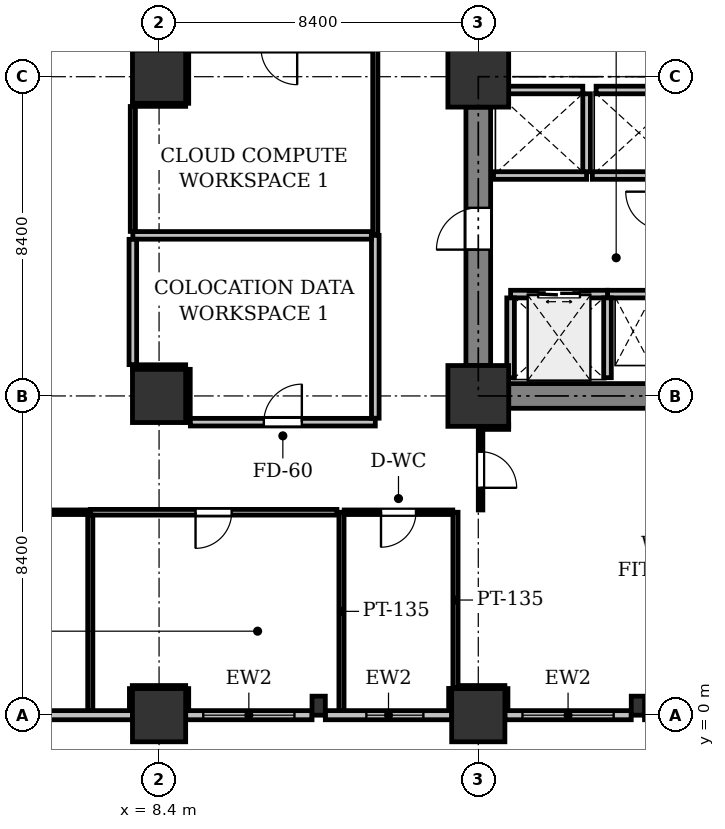
"""IFC4 building model, lengths in metres.
Left out: names, types, materials, properties, quantities, classifications, styles, units other than length and angle.
Written with IfcOpenShell. Run it as: python <this file> out.ifc"""

import sys

from ifc_helpers import new_model, si_unit, direction, frame, frame_2d, origin, origin_2d, place, context, subcontext, project, spatial, rectangle, extrude, element, fill, save


model = new_model("IFC4")
c1 = context("Model", 3, precision=1e-05, world=origin(), true_north=direction((0.0, 1.0)))
c2 = subcontext(c1, "Body", "Model", "MODEL_VIEW")
j1 = project(units=[si_unit("LENGTHUNIT", "METRE"), si_unit("PLANEANGLEUNIT", "RADIAN")], contexts=[c1])
p1 = place(None, origin())
s1 = spatial("IfcSite", under=j1, at=p1, CompositionType="ELEMENT")
p2 = place(p1, origin())
s2 = spatial("IfcBuilding", under=s1, at=p2, CompositionType="ELEMENT")
p3 = place(p2, frame((0.0, 0.0, 15.0)))
s3 = spatial("IfcBuildingStorey", under=s2, at=p3, CompositionType="ELEMENT", Elevation=15.0)
for number, where, z_axis, x_axis in (
    (1, (8.4, 0.0, 0.0), (0.0, 0.0, 1.0), (1.0, 0.0, 0.0)),
    (2, (8.4, 8.4, 0.0), (0.0, 0.0, 1.0), (1.0, 0.0, 0.0)),
    (3, (8.4, 16.8, 0.0), (0.0, 0.0, 1.0), (1.0, 0.0, 0.0)),
    (4, (16.8, 0.0, 0.0), (0.0, 0.0, 1.0), (1.0, 0.0, 0.0)),
):
    element("IfcColumn", number, at=place(p3, frame(where, z_axis=z_axis, x_axis=x_axis)), inside=s3, PredefinedType="COLUMN", context=c2, shape_type="SweptSolid", body=[
        extrude(rectangle(XDim=1.4, YDim=1.4, at=origin_2d()), origin(), (0.0, 0.0, 1.0), 4.8),
    ])
for number, where, z_axis, x_axis in (
    (5, (16.8, 8.4, 0.0), (0.0, 0.0, 1.0), (1.0, 0.0, 0.0)),
    (6, (16.8, 16.8, 0.0), (0.0, 0.0, 1.0), (1.0, 0.0, 0.0)),
):
    element("IfcColumn", number, at=place(p3, frame(where, z_axis=z_axis, x_axis=x_axis)), inside=s3, PredefinedType="COLUMN", context=c2, shape_type="SweptSolid", body=[
        extrude(rectangle(XDim=1.6, YDim=1.6, at=origin_2d()), origin(), (0.0, 0.0, 1.0), 4.8),
    ])
for number, where, z_axis, x_axis in (
    (7, (12.6, 0.25, 0.0), (0.0, 0.0, 1.0), (1.0, 0.0, 0.0)),
    (8, (21.0, 0.25, 0.0), (0.0, 0.0, 1.0), (1.0, 0.0, 0.0)),
):
    element("IfcColumn", number, at=place(p3, frame(where, z_axis=z_axis, x_axis=x_axis)), inside=s3, PredefinedType="PILASTER", context=c2, shape_type="SweptSolid", body=[
        extrude(rectangle(XDim=0.35, YDim=0.5, at=origin_2d()), origin(), (0.0, 0.0, 1.0), 4.8),
    ])
p4 = place(p3, frame((24.5, 0.0, 0.0), z_axis=(0.0, 0.0, 1.0), x_axis=(-1.0, 0.0, 0.0)))
e9 = element("IfcWall", 9, at=p4, inside=s3, PredefinedType="STANDARD", context=c2, shape_type="SweptSolid", body=[
    extrude(rectangle(XDim=3.325, YDim=0.24, at=frame_2d((1.663, 0.0))), origin(), (0.0, 0.0, 1.0), 3.05),
])
p5 = place(p4, frame((0.913, 0.0, 0.9)))
e10 = element("IfcOpeningElement", 10, at=p5, cuts=e9, PredefinedType="OPENING", context=c2, shape_type="SweptSolid", body=[
    extrude(rectangle(XDim=1.5, YDim=1.6, at=frame_2d((0.75, 0.8))), frame((0.0, 0.13, 0.0), z_axis=(0.0, -1.0, 0.0), x_axis=(1.0, 0.0, 0.0)), (0.0, 0.0, 1.0), 0.26),
])
p6 = place(p3, frame((20.825, 0.0, 0.0), z_axis=(0.0, 0.0, 1.0), x_axis=(-1.0, 0.0, 0.0)))
e11 = element("IfcWall", 11, at=p6, inside=s3, PredefinedType="STANDARD", context=c2, shape_type="SweptSolid", body=[
    extrude(rectangle(XDim=3.325, YDim=0.24, at=frame_2d((1.663, 0.0))), origin(), (0.0, 0.0, 1.0), 3.05),
])
p7 = place(p6, frame((0.462, 0.0, 0.9)))
e12 = element("IfcOpeningElement", 12, at=p7, cuts=e11, PredefinedType="OPENING", context=c2, shape_type="SweptSolid", body=[
    extrude(rectangle(XDim=2.4, YDim=1.8, at=frame_2d((1.2, 0.9))), frame((0.0, 0.13, 0.0), z_axis=(0.0, -1.0, 0.0), x_axis=(1.0, 0.0, 0.0)), (0.0, 0.0, 1.0), 0.26),
])
p8 = place(p3, frame((16.1, 0.0, 0.0), z_axis=(0.0, 0.0, 1.0), x_axis=(-1.0, 0.0, 0.0)))
e13 = element("IfcWall", 13, at=p8, inside=s3, PredefinedType="STANDARD", context=c2, shape_type="SweptSolid", body=[
    extrude(rectangle(XDim=3.325, YDim=0.24, at=frame_2d((1.663, 0.0))), origin(), (0.0, 0.0, 1.0), 3.05),
])
p9 = place(p8, frame((0.745, 0.0, 0.9)))
e14 = element("IfcOpeningElement", 14, at=p9, cuts=e13, PredefinedType="OPENING", context=c2, shape_type="SweptSolid", body=[
    extrude(rectangle(XDim=1.5, YDim=1.6, at=frame_2d((0.75, 0.8))), frame((0.0, 0.13, 0.0), z_axis=(0.0, -1.0, 0.0), x_axis=(1.0, 0.0, 0.0)), (0.0, 0.0, 1.0), 0.26),
])
p10 = place(p3, frame((12.425, 0.0, 0.0), z_axis=(0.0, 0.0, 1.0), x_axis=(-1.0, 0.0, 0.0)))
e15 = element("IfcWall", 15, at=p10, inside=s3, PredefinedType="STANDARD", context=c2, shape_type="SweptSolid", body=[
    extrude(rectangle(XDim=3.325, YDim=0.24, at=frame_2d((1.663, 0.0))), origin(), (0.0, 0.0, 1.0), 3.05),
])
p11 = place(p10, frame((0.462, 0.0, 0.9)))
e16 = element("IfcOpeningElement", 16, at=p11, cuts=e15, PredefinedType="OPENING", context=c2, shape_type="SweptSolid", body=[
    extrude(rectangle(XDim=2.4, YDim=1.8, at=frame_2d((1.2, 0.9))), frame((0.0, 0.13, 0.0), z_axis=(0.0, -1.0, 0.0), x_axis=(1.0, 0.0, 0.0)), (0.0, 0.0, 1.0), 0.26),
])
p12 = place(p3, frame((7.7, 0.0, 0.0), z_axis=(0.0, 0.0, 1.0), x_axis=(-1.0, 0.0, 0.0)))
e17 = element("IfcWall", 17, at=p12, inside=s3, PredefinedType="STANDARD", context=c2, shape_type="SweptSolid", body=[
    extrude(rectangle(XDim=7.0, YDim=0.24, at=frame_2d((3.5, 0.0))), origin(), (0.0, 0.0, 1.0), 3.05),
])
p13 = place(p12, frame((3.27, 0.0, 0.9)))
e18 = element("IfcOpeningElement", 18, at=p13, cuts=e17, PredefinedType="OPENING", context=c2, shape_type="SweptSolid", body=[
    extrude(rectangle(XDim=1.5, YDim=1.6, at=frame_2d((0.75, 0.8))), frame((0.0, 0.13, 0.0), z_axis=(0.0, -1.0, 0.0), x_axis=(1.0, 0.0, 0.0)), (0.0, 0.0, 1.0), 0.26),
])
p14 = place(p3, frame((17.6, 8.4, 0.0), z_axis=(0.0, 0.0, 1.0), x_axis=(1.0, 0.0, 0.0)))
e19 = element("IfcWall", 19, at=p14, inside=s3, PredefinedType="SHEAR", context=c2, shape_type="SweptSolid", body=[
    extrude(rectangle(XDim=6.8, YDim=0.65, at=frame_2d((3.4, 0.0))), origin(), (0.0, 0.0, 1.0), 4.45),
])
p15 = place(p3, frame((16.8, 9.2, 0.0), z_axis=(0.0, 0.0, 1.0), x_axis=(0.0, 1.0, 0.0)))
e20 = element("IfcWall", 20, at=p15, inside=s3, PredefinedType="SHEAR", context=c2, shape_type="SweptSolid", body=[
    extrude(rectangle(XDim=6.8, YDim=0.65, at=frame_2d((3.4, 0.0))), origin(), (0.0, 0.0, 1.0), 4.45),
])
p16 = place(p15, frame((3.05, 0.0, 0.0)))
e21 = element("IfcOpeningElement", 21, at=p16, cuts=e20, PredefinedType="OPENING", context=c2, shape_type="SweptSolid", body=[
    extrude(rectangle(XDim=1.1, YDim=2.15, at=frame_2d((0.55, 1.075))), frame((0.0, 0.335, 0.0), z_axis=(0.0, -1.0, 0.0), x_axis=(1.0, 0.0, 0.0)), (0.0, 0.0, 1.0), 0.67),
])
p17 = place(p3, frame((20.2, 11.08, 0.0), z_axis=(0.0, 0.0, 1.0), x_axis=(1.0, 0.0, 0.0)))
e22 = element("IfcWall", 22, at=p17, inside=s3, PredefinedType="PARTITIONING", context=c2, shape_type="SweptSolid", body=[
    extrude(rectangle(XDim=1.35, YDim=0.2, at=frame_2d((0.675, 0.0))), origin(), (0.0, 0.0, 1.0), 4.45),
])
p18 = place(p3, frame((17.65, 11.08, 0.0), z_axis=(0.0, 0.0, 1.0), x_axis=(1.0, 0.0, 0.0)))
e23 = element("IfcWall", 23, at=p18, inside=s3, PredefinedType="PARTITIONING", context=c2, shape_type="SweptSolid", body=[
    extrude(rectangle(XDim=2.55, YDim=0.2, at=frame_2d((1.275, 0.0))), origin(), (0.0, 0.0, 1.0), 4.45),
])
p19 = place(p18, frame((0.725, 0.0, 0.0)))
e24 = element("IfcOpeningElement", 24, at=p19, cuts=e23, PredefinedType="OPENING", context=c2, shape_type="SweptSolid", body=[
    extrude(rectangle(XDim=1.1, YDim=2.2, at=frame_2d((0.55, 1.1))), frame((0.0, 0.11, 0.0), z_axis=(0.0, -1.0, 0.0), x_axis=(1.0, 0.0, 0.0)), (0.0, 0.0, 1.0), 0.22),
])
for number, where, z_axis, x_axis in (
    (25, (20.2, 8.88, 0.0), (0.0, 0.0, 1.0), (0.0, 1.0, 0.0)),
    (26, (17.65, 8.88, 0.0), (0.0, 0.0, 1.0), (0.0, 1.0, 0.0)),
):
    element("IfcWall", number, at=place(p3, frame(where, z_axis=z_axis, x_axis=x_axis)), inside=s3, PredefinedType="PARTITIONING", context=c2, shape_type="SweptSolid", body=[
        extrude(rectangle(XDim=2.1, YDim=0.2, at=frame_2d((1.05, 0.0))), origin(), (0.0, 0.0, 1.0), 4.45),
    ])
p20 = place(p3, frame((17.2, 14.2, 0.0), z_axis=(0.0, 0.0, 1.0), x_axis=(1.0, 0.0, 0.0)))
e27 = element("IfcWall", 27, at=p20, inside=s3, PredefinedType="PARTITIONING", context=c2, shape_type="SweptSolid", body=[
    extrude(rectangle(XDim=2.45, YDim=0.2, at=frame_2d((1.225, 0.0))), origin(), (0.0, 0.0, 1.0), 4.45),
])
p21 = place(p3, frame((19.65, 14.3, 0.0), z_axis=(0.0, 0.0, 1.0), x_axis=(0.0, 1.0, 0.0)))
e28 = element("IfcWall", 28, at=p21, inside=s3, PredefinedType="PARTITIONING", context=c2, shape_type="SweptSolid", body=[
    extrude(rectangle(XDim=2.05, YDim=0.2, at=frame_2d((1.025, 0.0))), origin(), (0.0, 0.0, 1.0), 4.45),
])
p22 = place(p3, frame((17.3, 16.45, 0.0), z_axis=(0.0, 0.0, 1.0), x_axis=(1.0, 0.0, 0.0)))
e29 = element("IfcWall", 29, at=p22, inside=s3, PredefinedType="PARTITIONING", context=c2, shape_type="SweptSolid", body=[
    extrude(rectangle(XDim=2.25, YDim=0.2, at=frame_2d((1.125, 0.0))), origin(), (0.0, 0.0, 1.0), 3.05),
])
p23 = place(p3, frame((19.8, 14.2, 0.0), z_axis=(0.0, 0.0, 1.0), x_axis=(1.0, 0.0, 0.0)))
e30 = element("IfcWall", 30, at=p23, inside=s3, PredefinedType="PARTITIONING", context=c2, shape_type="SweptSolid", body=[
    extrude(rectangle(XDim=2.45, YDim=0.2, at=frame_2d((1.225, 0.0))), origin(), (0.0, 0.0, 1.0), 4.45),
])
p24 = place(p3, frame((19.9, 16.45, 0.0), z_axis=(0.0, 0.0, 1.0), x_axis=(1.0, 0.0, 0.0)))
e31 = element("IfcWall", 31, at=p24, inside=s3, PredefinedType="PARTITIONING", context=c2, shape_type="SweptSolid", body=[
    extrude(rectangle(XDim=2.25, YDim=0.2, at=frame_2d((1.125, 0.0))), origin(), (0.0, 0.0, 1.0), 3.05),
])
p25 = place(p3, frame((13.2, 5.34, 0.0), z_axis=(0.0, 0.0, 1.0), x_axis=(0.0, -1.0, 0.0)))
e32 = element("IfcWall", 32, at=p25, inside=s3, PredefinedType="PARTITIONING", context=c2, shape_type="SweptSolid", body=[
    extrude(rectangle(XDim=5.216, YDim=0.135, at=frame_2d((2.608, 0.0))), origin(), (0.0, 0.0, 1.0), 3.05),
])
p26 = place(p3, frame((16.08, 0.124, 0.0), z_axis=(0.0, 0.0, 1.0), x_axis=(0.000421052594, 0.999999911357, 0.0)))
e33 = element("IfcWall", 33, at=p26, inside=s3, PredefinedType="PARTITIONING", context=c2, shape_type="SweptSolid", body=[
    extrude(rectangle(XDim=0.58, YDim=0.12, at=frame_2d((0.29, 0.0))), origin(), (0.0, 0.0, 1.0), 3.05),
])
p27 = place(p3, frame((16.2, 0.72, 0.0), z_axis=(0.0, 0.0, 1.0), x_axis=(0.0, 1.0, 0.0)))
e34 = element("IfcWall", 34, at=p27, inside=s3, PredefinedType="PARTITIONING", context=c2, shape_type="SweptSolid", body=[
    extrude(rectangle(XDim=4.62, YDim=0.135, at=frame_2d((2.31, 0.0))), origin(), (0.0, 0.0, 1.0), 4.45),
])
p28 = place(p3, frame((16.128, 5.34, 0.0), z_axis=(0.0, 0.0, 1.0), x_axis=(-1.0, 0.0, 0.0)))
e35 = element("IfcWall", 35, at=p28, inside=s3, PredefinedType="PARTITIONING", context=c2, shape_type="SweptSolid", body=[
    extrude(rectangle(XDim=2.857, YDim=0.12, at=frame_2d((1.428, 0.0))), origin(), (0.0, 0.0, 1.0), 4.45),
])
p29 = place(p28, frame((0.969, 0.0, 0.0)))
e36 = element("IfcOpeningElement", 36, at=p29, cuts=e35, PredefinedType="OPENING", context=c2, shape_type="SweptSolid", body=[
    extrude(rectangle(XDim=0.92, YDim=2.1, at=frame_2d((0.46, 1.05))), frame((0.0, 0.07, 0.0), z_axis=(0.0, -1.0, 0.0), x_axis=(1.0, 0.0, 0.0)), (0.0, 0.0, 1.0), 0.14),
])
p30 = place(p3, frame((7.71, 9.12, 0.0), z_axis=(0.0, 0.0, 1.0), x_axis=(1.0, 0.0, 0.0)))
e37 = element("IfcWall", 37, at=p30, inside=s3, PredefinedType="PARTITIONING", context=c2, shape_type="SweptSolid", body=[
    extrude(rectangle(XDim=1.39, YDim=0.2, at=frame_2d((0.695, 0.0))), origin(), (0.0, 0.0, 1.0), 3.25),
])
p31 = place(p3, frame((9.12, 9.1, 0.0), z_axis=(0.0, 0.0, 1.0), x_axis=(0.0, -1.0, 0.0)))
e38 = element("IfcWall", 38, at=p31, inside=s3, PredefinedType="PARTITIONING", context=c2, shape_type="SweptSolid", body=[
    extrude(rectangle(XDim=1.39, YDim=0.2, at=frame_2d((0.695, 0.0))), origin(), (0.0, 0.0, 1.0), 3.05),
])
p32 = place(p3, frame((9.224, 7.71, 0.0), z_axis=(0.0, 0.0, 1.0), x_axis=(1.0, 0.0, 0.0)))
e39 = element("IfcWall", 39, at=p32, inside=s3, PredefinedType="PARTITIONING", context=c2, shape_type="SweptSolid", body=[
    extrude(rectangle(XDim=4.866, YDim=0.2, at=frame_2d((2.433, 0.0))), origin(), (0.0, 0.0, 1.0), 4.044),
])
p33 = place(p32, frame((1.933, 0.0, 0.0)))
e40 = element("IfcOpeningElement", 40, at=p33, cuts=e39, PredefinedType="OPENING", context=c2, shape_type="SweptSolid", body=[
    extrude(rectangle(XDim=1.0, YDim=2.15, at=frame_2d((0.5, 1.075))), frame((0.0, 0.11, 0.0), z_axis=(0.0, -1.0, 0.0), x_axis=(1.0, 0.0, 0.0)), (0.0, 0.0, 1.0), 0.22),
])
p34 = place(p3, frame((14.09, 7.814, 0.0), z_axis=(0.0, 0.0, 1.0), x_axis=(0.0, 1.0, 0.0)))
e41 = element("IfcWall", 41, at=p34, inside=s3, PredefinedType="PARTITIONING", context=c2, shape_type="SweptSolid", body=[
    extrude(rectangle(XDim=4.811, YDim=0.2, at=frame_2d((2.406, 0.0))), origin(), (0.0, 0.0, 1.0), 3.05),
])
p35 = place(p3, frame((13.986, 12.625, 0.0), z_axis=(0.0, 0.0, 1.0), x_axis=(-1.0, 0.0, 0.0)))
e42 = element("IfcWall", 42, at=p35, inside=s3, PredefinedType="PARTITIONING", context=c2, shape_type="SweptSolid", body=[
    extrude(rectangle(XDim=6.276, YDim=0.2, at=frame_2d((3.138, 0.0))), origin(), (0.0, 0.0, 1.0), 3.25),
])
p36 = place(p3, frame((7.71, 12.521, 0.0), z_axis=(0.0, 0.0, 1.0), x_axis=(0.0, -1.0, 0.0)))
e43 = element("IfcWall", 43, at=p36, inside=s3, PredefinedType="PARTITIONING", context=c2, shape_type="SweptSolid", body=[
    extrude(rectangle(XDim=3.297, YDim=0.2, at=frame_2d((1.648, 0.0))), origin(), (0.0, 0.0, 1.0), 4.45),
])
p37 = place(p3, frame((9.12, 17.5, 0.0), z_axis=(0.0, 0.0, 1.0), x_axis=(0.0, -1.0, 0.0)))
e44 = element("IfcWall", 44, at=p37, inside=s3, PredefinedType="PARTITIONING", context=c2, shape_type="SweptSolid", body=[
    extrude(rectangle(XDim=1.4, YDim=0.12, at=frame_2d((0.7, 0.0))), origin(), (0.0, 0.0, 1.0), 3.05),
])
p38 = place(p3, frame((9.1, 16.08, 0.0), z_axis=(0.0, 0.0, 1.0), x_axis=(-1.0, 0.0, 0.0)))
e45 = element("IfcWall", 45, at=p38, inside=s3, PredefinedType="PARTITIONING", context=c2, shape_type="SweptSolid", body=[
    extrude(rectangle(XDim=1.39, YDim=0.12, at=frame_2d((0.695, 0.0))), origin(), (0.0, 0.0, 1.0), 3.25),
])
p39 = place(p3, frame((7.71, 16.016, 0.0), z_axis=(0.0, 0.0, 1.0), x_axis=(0.0, -1.0, 0.0)))
e46 = element("IfcWall", 46, at=p39, inside=s3, PredefinedType="PARTITIONING", context=c2, shape_type="SweptSolid", body=[
    extrude(rectangle(XDim=3.287, YDim=0.135, at=frame_2d((1.644, 0.0))), origin(), (0.0, 0.0, 1.0), 4.45),
])
p40 = place(p3, frame((14.09, 12.645, 0.0), z_axis=(0.0, 0.0, 1.0), x_axis=(0.0, 1.0, 0.0)))
e47 = element("IfcWall", 47, at=p40, inside=s3, PredefinedType="PARTITIONING", context=c2, shape_type="SweptSolid", body=[
    extrude(rectangle(XDim=4.895, YDim=0.135, at=frame_2d((2.448, 0.0))), origin(), (0.0, 0.0, 1.0), 3.05),
])
p41 = place(p3, frame((13.08, 5.34, 0.0), z_axis=(0.0, 0.0, 1.0), x_axis=(-1.0, 0.0, 0.0)))
e48 = element("IfcWall", 48, at=p41, inside=s3, PredefinedType="PARTITIONING", context=c2, shape_type="SweptSolid", body=[
    extrude(rectangle(XDim=6.49, YDim=0.15, at=frame_2d((3.245, 0.0))), origin(), (0.0, 0.0, 1.0), 3.25),
])
p42 = place(p41, frame((2.77, 0.0, 0.0)))
e49 = element("IfcOpeningElement", 49, at=p42, cuts=e48, PredefinedType="OPENING", context=c2, shape_type="SweptSolid", body=[
    extrude(rectangle(XDim=0.95, YDim=2.15, at=frame_2d((0.475, 1.075))), frame((0.0, 0.085, 0.0), z_axis=(0.0, -1.0, 0.0), x_axis=(1.0, 0.0, 0.0)), (0.0, 0.0, 1.0), 0.17),
])
p43 = place(p3, frame((6.59, 5.261, 0.0), z_axis=(0.0, 0.0, 1.0), x_axis=(0.0, -1.0, 0.0)))
e50 = element("IfcWall", 50, at=p43, inside=s3, PredefinedType="PARTITIONING", context=c2, shape_type="SweptSolid", body=[
    extrude(rectangle(XDim=5.137, YDim=0.135, at=frame_2d((2.568, 0.0))), origin(), (0.0, 0.0, 1.0), 3.05),
])
p44 = place(p3, frame((7.68, 0.124, 0.0), z_axis=(0.0, 0.0, 1.0), x_axis=(0.0, 1.0, 0.0)))
e51 = element("IfcWall", 51, at=p44, inside=s3, PredefinedType="PARTITIONING", context=c2, shape_type="SweptSolid", body=[
    extrude(rectangle(XDim=0.576, YDim=0.12, at=frame_2d((0.288, 0.0))), origin(), (0.0, 0.0, 1.0), 3.05),
])
p45 = place(p3, frame((7.696, 0.719, 0.0), z_axis=(0.0, 0.0, 1.0), x_axis=(0.99999993953, 0.000347765585, 0.0)))
e52 = element("IfcWall", 52, at=p45, inside=s3, PredefinedType="PARTITIONING", context=c2, shape_type="SweptSolid", body=[
    extrude(rectangle(XDim=1.404, YDim=0.12, at=frame_2d((0.702, 0.0))), origin(), (0.0, 0.0, 1.0), 3.25),
])
p46 = place(p3, frame((9.12, 0.7, 0.0), z_axis=(0.0, 0.0, 1.0), x_axis=(0.0, -1.0, 0.0)))
e53 = element("IfcWall", 53, at=p46, inside=s3, PredefinedType="PARTITIONING", context=c2, shape_type="SweptSolid", body=[
    extrude(rectangle(XDim=0.576, YDim=0.12, at=frame_2d((0.288, 0.0))), origin(), (0.0, 0.0, 1.0), 3.05),
])
p47 = place(p3, frame((6.57, 5.34, 0.0), z_axis=(0.0, 0.0, 1.0), x_axis=(-1.0, 0.0, 0.0)))
e54 = element("IfcWall", 54, at=p47, inside=s3, PredefinedType="PARTITIONING", context=c2, shape_type="SweptSolid", body=[
    extrude(rectangle(XDim=1.17, YDim=0.12, at=frame_2d((0.585, 0.0))), origin(), (0.0, 0.0, 1.0), 4.45),
])
p48 = place(p3, frame((16.32, 0.72, 0.0), z_axis=(0.0, 0.0, 1.0), x_axis=(1.0, 0.0, 0.0)))
e55 = element("IfcWall", 55, at=p48, inside=s3, PredefinedType="PARTITIONING", context=c2, shape_type="SweptSolid", body=[
    extrude(rectangle(XDim=1.18, YDim=0.12, at=frame_2d((0.59, 0.0))), origin(), (0.0, 0.0, 1.0), 3.25),
])
p49 = place(p3, frame((17.52, 0.7, 0.0), z_axis=(0.0, 0.0, 1.0), x_axis=(0.0, -1.0, 0.0)))
e56 = element("IfcWall", 56, at=p49, inside=s3, PredefinedType="PARTITIONING", context=c2, shape_type="SweptSolid", body=[
    extrude(rectangle(XDim=0.576, YDim=0.12, at=frame_2d((0.288, 0.0))), origin(), (0.0, 0.0, 1.0), 3.05),
])
p50 = place(p3, frame((17.6, 7.58, 0.0), z_axis=(0.0, 0.0, 1.0), x_axis=(-1.0, 0.0, 0.0)))
e57 = element("IfcWall", 57, at=p50, inside=s3, PredefinedType="PARTITIONING", context=c2, shape_type="SweptSolid", body=[
    extrude(rectangle(XDim=0.74, YDim=0.12, at=frame_2d((0.37, 0.0))), origin(), (0.0, 0.0, 1.0), 3.25),
])
p51 = place(p3, frame((16.86, 7.516, 0.0), z_axis=(0.0, 0.0, 1.0), x_axis=(0.0, -1.0, 0.0)))
e58 = element("IfcWall", 58, at=p51, inside=s3, PredefinedType="PARTITIONING", context=c2, shape_type="SweptSolid", body=[
    extrude(rectangle(XDim=2.116, YDim=0.12, at=frame_2d((1.058, 0.0))), origin(), (0.0, 0.0, 1.0), 3.25),
])
p52 = place(p51, frame((0.583, 0.0, 0.0)))
e59 = element("IfcOpeningElement", 59, at=p52, cuts=e58, PredefinedType="OPENING", context=c2, shape_type="SweptSolid", body=[
    extrude(rectangle(XDim=0.95, YDim=2.15, at=frame_2d((0.475, 1.075))), frame((0.0, 0.07, 0.0), z_axis=(0.0, -1.0, 0.0), x_axis=(1.0, 0.0, 0.0)), (0.0, 0.0, 1.0), 0.14),
])
p53 = place(p7, origin())
e60 = element("IfcWindow", 60, at=p53, inside=s3, PartitioningType="SINGLE_PANEL", PredefinedType="WINDOW", context=c2, shape_type="SweptSolid", body=[
    extrude(rectangle(XDim=2.4, YDim=1.8, at=frame_2d((1.2, 0.9))), frame((0.0, 0.03, 0.0), z_axis=(0.0, -1.0, 0.0), x_axis=(1.0, 0.0, 0.0)), (0.0, 0.0, 1.0), 0.06),
])
fill(e12, e60)
p54 = place(p9, origin())
e61 = element("IfcWindow", 61, at=p54, inside=s3, PartitioningType="SINGLE_PANEL", PredefinedType="WINDOW", context=c2, shape_type="SweptSolid", body=[
    extrude(rectangle(XDim=1.5, YDim=1.6, at=frame_2d((0.75, 0.8))), frame((0.0, 0.03, 0.0), z_axis=(0.0, -1.0, 0.0), x_axis=(1.0, 0.0, 0.0)), (0.0, 0.0, 1.0), 0.06),
])
fill(e14, e61)
p55 = place(p11, origin())
e62 = element("IfcWindow", 62, at=p55, inside=s3, PartitioningType="SINGLE_PANEL", PredefinedType="WINDOW", context=c2, shape_type="SweptSolid", body=[
    extrude(rectangle(XDim=2.4, YDim=1.8, at=frame_2d((1.2, 0.9))), frame((0.0, 0.03, 0.0), z_axis=(0.0, -1.0, 0.0), x_axis=(1.0, 0.0, 0.0)), (0.0, 0.0, 1.0), 0.06),
])
fill(e16, e62)
p56 = place(p16, origin())
e63 = element("IfcDoor", 63, at=p56, inside=s3, OperationType="SINGLE_SWING_LEFT", PredefinedType="DOOR", context=c2, shape_type="SweptSolid", body=[
    extrude(rectangle(XDim=1.1, YDim=2.15, at=frame_2d((0.55, 1.075))), frame((0.0, 0.025, 0.0), z_axis=(0.0, -1.0, 0.0), x_axis=(1.0, 0.0, 0.0)), (0.0, 0.0, 1.0), 0.05),
])
fill(e21, e63)
p57 = place(p19, origin())
e64 = element("IfcDoor", 64, at=p57, inside=s3, OperationType="DOUBLE_DOOR_SLIDING", PredefinedType="DOOR", context=c2, shape_type="SweptSolid", body=[
    extrude(rectangle(XDim=1.1, YDim=2.2, at=frame_2d((0.55, 1.1))), frame((0.0, 0.025, 0.0), z_axis=(0.0, -1.0, 0.0), x_axis=(1.0, 0.0, 0.0)), (0.0, 0.0, 1.0), 0.05),
])
fill(e24, e64)
p58 = place(p29, origin())
e65 = element("IfcDoor", 65, at=p58, inside=s3, OperationType="SINGLE_SWING_RIGHT", PredefinedType="DOOR", context=c2, shape_type="SweptSolid", body=[
    extrude(rectangle(XDim=0.92, YDim=2.1, at=frame_2d((0.46, 1.05))), frame((0.0, 0.025, 0.0), z_axis=(0.0, -1.0, 0.0), x_axis=(1.0, 0.0, 0.0)), (0.0, 0.0, 1.0), 0.05),
])
fill(e36, e65)
p59 = place(p33, origin())
e66 = element("IfcDoor", 66, at=p59, inside=s3, OperationType="SINGLE_SWING_RIGHT", PredefinedType="DOOR", context=c2, shape_type="SweptSolid", body=[
    extrude(rectangle(XDim=1.0, YDim=2.15, at=frame_2d((0.5, 1.075))), frame((0.0, 0.025, 0.0), z_axis=(0.0, -1.0, 0.0), x_axis=(1.0, 0.0, 0.0)), (0.0, 0.0, 1.0), 0.05),
])
fill(e40, e66)
p60 = place(p42, origin())
e67 = element("IfcDoor", 67, at=p60, inside=s3, OperationType="SINGLE_SWING_RIGHT", PredefinedType="DOOR", context=c2, shape_type="SweptSolid", body=[
    extrude(rectangle(XDim=0.95, YDim=2.15, at=frame_2d((0.475, 1.075))), frame((0.0, 0.025, 0.0), z_axis=(0.0, -1.0, 0.0), x_axis=(1.0, 0.0, 0.0)), (0.0, 0.0, 1.0), 0.05),
])
fill(e49, e67)
p61 = place(p52, origin())
e68 = element("IfcDoor", 68, at=p61, inside=s3, OperationType="SINGLE_SWING_RIGHT", PredefinedType="DOOR", context=c2, shape_type="SweptSolid", body=[
    extrude(rectangle(XDim=0.95, YDim=2.15, at=frame_2d((0.475, 1.075))), frame((0.0, 0.025, 0.0), z_axis=(0.0, -1.0, 0.0), x_axis=(1.0, 0.0, 0.0)), (0.0, 0.0, 1.0), 0.05),
])
fill(e59, e68)
save(model, sys.argv[1])
